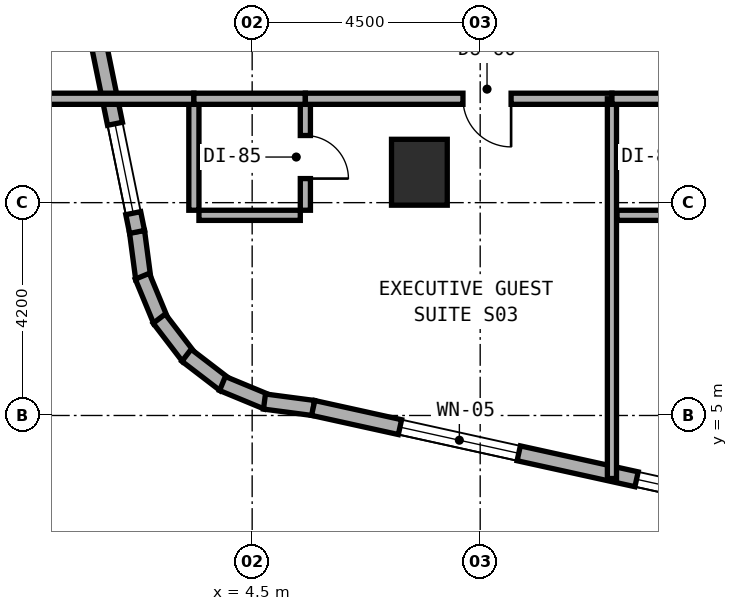
"""IFC4 building model, lengths in metres.
Left out: names, types, materials, properties, quantities, classifications, styles, units other than length and angle.
Written with IfcOpenShell. Run it as: python <this file> out.ifc"""

import sys

from ifc_helpers import new_model, si_unit, direction, frame, frame_2d, origin, origin_2d, place, context, subcontext, project, spatial, rectangle, extrude, element, fill, save


model = new_model("IFC4")
c1 = context("Model", 3, precision=1e-05, world=origin(), true_north=direction((0.0, 1.0)))
c2 = subcontext(c1, "Body", "Model", "MODEL_VIEW")
j1 = project(units=[si_unit("LENGTHUNIT", "METRE"), si_unit("PLANEANGLEUNIT", "RADIAN")], contexts=[c1])
p1 = place(None, origin())
s1 = spatial("IfcSite", under=j1, at=p1, CompositionType="ELEMENT")
p2 = place(p1, origin())
s2 = spatial("IfcBuilding", under=s1, at=p2, CompositionType="ELEMENT")
p3 = place(p2, frame((0.0, 0.0, 45.0)))
s3 = spatial("IfcBuildingStorey", under=s2, at=p3, CompositionType="ELEMENT", Elevation=45.0)
p4 = place(p3, frame((7.8, 9.8, 0.0), z_axis=(0.0, 0.0, 1.0), x_axis=(1.0, 0.0, 0.0)))
e1 = element("IfcColumn", 1, at=p4, inside=s3, PredefinedType="COLUMN", context=c2, shape_type="SweptSolid", body=[
    extrude(rectangle(XDim=1.1, YDim=1.3, at=origin_2d()), origin(), (0.0, 0.0, 1.0), 3.5),
])
p5 = place(p3, frame((2.228, 8.628, 0.0), z_axis=(0.0, 0.0, 1.0), x_axis=(0.131174864804, -0.991359246108, 0.0)))
e2 = element("IfcWall", 2, at=p5, inside=s3, PredefinedType="STANDARD", context=c2, shape_type="SweptSolid", body=[
    extrude(rectangle(XDim=0.938, YDim=0.3, at=frame_2d((0.469, 0.0))), origin(), (0.0, 0.0, 1.0), 3.22),
])
p6 = place(p3, frame((2.332, 7.748, 0.0), z_axis=(0.0, 0.0, 1.0), x_axis=(0.382344263057, -0.924019948111, 0.0)))
e3 = element("IfcWall", 3, at=p6, inside=s3, PredefinedType="STANDARD", context=c2, shape_type="SweptSolid", body=[
    extrude(rectangle(XDim=0.955, YDim=0.3, at=frame_2d((0.477, 0.0))), origin(), (0.0, 0.0, 1.0), 3.22),
])
for number, where, z_axis, x_axis in (
    (4, (2.666, 6.911, 0.0), (0.0, 0.0, 1.0), (0.608, -0.794, 0.0)),
    (5, (3.205, 6.188, 0.0), (0.0, 0.0, 1.0), (0.794, -0.608, 0.0)),
):
    element("IfcWall", number, at=place(p3, frame(where, z_axis=z_axis, x_axis=x_axis)), inside=s3, PredefinedType="STANDARD", context=c2, shape_type="SweptSolid", body=[
        extrude(rectangle(XDim=0.955, YDim=0.3, at=frame_2d((0.478, 0.0))), origin(), (0.0, 0.0, 1.0), 3.22),
    ])
p7 = place(p3, frame((3.914, 5.631, 0.0), z_axis=(0.0, 0.0, 1.0), x_axis=(0.923982547689, -0.382434636986, 0.0)))
e6 = element("IfcWall", 6, at=p7, inside=s3, PredefinedType="STANDARD", context=c2, shape_type="SweptSolid", body=[
    extrude(rectangle(XDim=0.954, YDim=0.3, at=frame_2d((0.477, 0.0))), origin(), (0.0, 0.0, 1.0), 3.22),
])
p8 = place(p3, frame((4.743, 5.275, 0.0), z_axis=(0.0, 0.0, 1.0), x_axis=(0.99145856342, -0.130422072598, 0.0)))
e7 = element("IfcWall", 7, at=p8, inside=s3, PredefinedType="STANDARD", context=c2, shape_type="SweptSolid", body=[
    extrude(rectangle(XDim=0.973, YDim=0.3, at=frame_2d((0.487, 0.0))), origin(), (0.0, 0.0, 1.0), 3.22),
])
p9 = place(p3, frame((5.704, 5.148, 0.0), z_axis=(0.0, 0.0, 1.0), x_axis=(0.9765437942, -0.215318875183, 0.0)))
e8 = element("IfcWall", 8, at=p9, inside=s3, PredefinedType="STANDARD", context=c2, shape_type="SweptSolid", body=[
    extrude(rectangle(XDim=9.353, YDim=0.3, at=frame_2d((4.677, 0.0))), origin(), (0.0, 0.0, 1.0), 3.22),
])
p10 = place(p9, frame((1.754, 0.0, 0.8)))
e9 = element("IfcOpeningElement", 9, at=p10, cuts=e8, PredefinedType="OPENING", context=c2, shape_type="SweptSolid", body=[
    extrude(rectangle(XDim=2.4, YDim=1.6, at=frame_2d((1.2, 0.8))), frame((0.0, 0.16, 0.0), z_axis=(0.0, -1.0, 0.0), x_axis=(1.0, 0.0, 0.0)), (0.0, 0.0, 1.0), 0.32),
])
p11 = place(p9, frame((6.535, 0.0, 0.8)))
e10 = element("IfcOpeningElement", 10, at=p11, cuts=e8, PredefinedType="OPENING", context=c2, shape_type="SweptSolid", body=[
    extrude(rectangle(XDim=2.4, YDim=1.6, at=frame_2d((1.2, 0.8))), frame((0.0, 0.16, 0.0), z_axis=(0.0, -1.0, 0.0), x_axis=(1.0, 0.0, 0.0)), (0.0, 0.0, 1.0), 0.32),
])
p12 = place(p3, frame((0.216, 18.484, 0.0), z_axis=(0.0, 0.0, 1.0), x_axis=(0.199990901713, -0.979797754249, 0.0)))
e11 = element("IfcWall", 11, at=p12, inside=s3, PredefinedType="STANDARD", context=c2, shape_type="SweptSolid", body=[
    extrude(rectangle(XDim=10.065, YDim=0.3, at=frame_2d((5.033, 0.0))), origin(), (0.0, 0.0, 1.0), 3.22),
])
p13 = place(p12, frame((2.429, 0.0, 0.8)))
e12 = element("IfcOpeningElement", 12, at=p13, cuts=e11, PredefinedType="OPENING", context=c2, shape_type="SweptSolid", body=[
    extrude(rectangle(XDim=2.4, YDim=1.6, at=frame_2d((1.2, 0.8))), frame((0.0, 0.16, 0.0), z_axis=(0.0, -1.0, 0.0), x_axis=(1.0, 0.0, 0.0)), (0.0, 0.0, 1.0), 0.32),
])
p14 = place(p12, frame((7.887, 0.0, 0.85)))
e13 = element("IfcOpeningElement", 13, at=p14, cuts=e11, PredefinedType="OPENING", context=c2, shape_type="SweptSolid", body=[
    extrude(rectangle(XDim=1.8, YDim=1.5, at=frame_2d((0.9, 0.75))), frame((0.0, 0.16, 0.0), z_axis=(0.0, -1.0, 0.0), x_axis=(1.0, 0.0, 0.0)), (0.0, 0.0, 1.0), 0.32),
])
p15 = place(p3, frame((5.55, 9.05, 0.0), z_axis=(0.0, 0.0, 1.0), x_axis=(0.0, 1.0, 0.0)))
e14 = element("IfcWall", 14, at=p15, inside=s3, PredefinedType="PLUMBINGWALL", context=c2, shape_type="SweptSolid", body=[
    extrude(rectangle(XDim=2.1, YDim=0.2, at=frame_2d((1.05, 0.0))), origin(), (0.0, 0.0, 1.0), 3.22),
])
p16 = place(p15, frame((0.625, 0.0, 0.0)))
e15 = element("IfcOpeningElement", 15, at=p16, cuts=e14, PredefinedType="OPENING", context=c2, shape_type="SweptSolid", body=[
    extrude(rectangle(XDim=0.85, YDim=2.1, at=frame_2d((0.425, 1.05))), frame((0.0, 0.11, 0.0), z_axis=(0.0, -1.0, 0.0), x_axis=(1.0, 0.0, 0.0)), (0.0, 0.0, 1.0), 0.22),
])
p17 = place(p3, frame((3.45, 8.95, 0.0), z_axis=(0.0, 0.0, 1.0), x_axis=(1.0, 0.0, 0.0)))
e16 = element("IfcWall", 16, at=p17, inside=s3, PredefinedType="PLUMBINGWALL", context=c2, shape_type="SweptSolid", body=[
    extrude(rectangle(XDim=2.0, YDim=0.2, at=frame_2d((1.0, 0.0))), origin(), (0.0, 0.0, 1.0), 3.22),
])
p18 = place(p3, frame((3.35, 9.05, 0.0), z_axis=(0.0, 0.0, 1.0), x_axis=(0.0, 1.0, 0.0)))
e17 = element("IfcWall", 17, at=p18, inside=s3, PredefinedType="PLUMBINGWALL", context=c2, shape_type="SweptSolid", body=[
    extrude(rectangle(XDim=2.1, YDim=0.2, at=frame_2d((1.05, 0.0))), origin(), (0.0, 0.0, 1.0), 3.22),
])
p19 = place(p3, frame((0.24, 11.25, 0.0), z_axis=(0.0, 0.0, 1.0), x_axis=(1.0, 0.0, 0.0)))
e18 = element("IfcWall", 18, at=p19, inside=s3, PredefinedType="SOLIDWALL", context=c2, shape_type="SweptSolid", body=[
    extrude(rectangle(XDim=3.11, YDim=0.22, at=frame_2d((1.555, 0.0))), origin(), (0.0, 0.0, 1.0), 3.22),
])
p20 = place(p3, frame((3.35, 11.25, 0.0), z_axis=(0.0, 0.0, 1.0), x_axis=(1.0, 0.0, 0.0)))
e19 = element("IfcWall", 19, at=p20, inside=s3, PredefinedType="SOLIDWALL", context=c2, shape_type="SweptSolid", body=[
    extrude(rectangle(XDim=2.2, YDim=0.22, at=frame_2d((1.1, 0.0))), origin(), (0.0, 0.0, 1.0), 3.22),
])
p21 = place(p3, frame((5.55, 11.25, 0.0), z_axis=(0.0, 0.0, 1.0), x_axis=(1.0, 0.0, 0.0)))
e20 = element("IfcWall", 20, at=p21, inside=s3, PredefinedType="SOLIDWALL", context=c2, shape_type="SweptSolid", body=[
    extrude(rectangle(XDim=6.05, YDim=0.22, at=frame_2d((3.025, 0.0))), origin(), (0.0, 0.0, 1.0), 2.395),
])
p22 = place(p21, frame((3.11, 0.0, 0.0)))
e21 = element("IfcOpeningElement", 21, at=p22, cuts=e20, PredefinedType="OPENING", context=c2, shape_type="SweptSolid", body=[
    extrude(rectangle(XDim=0.95, YDim=2.1, at=frame_2d((0.475, 1.05))), frame((0.0, 0.12, 0.0), z_axis=(0.0, -1.0, 0.0), x_axis=(1.0, 0.0, 0.0)), (0.0, 0.0, 1.0), 0.24),
])
p23 = place(p3, frame((11.6, 3.756, 0.0), z_axis=(0.0, 0.0, 1.0), x_axis=(0.0, 1.0, 0.0)))
e22 = element("IfcWall", 22, at=p23, inside=s3, PredefinedType="SOLIDWALL", context=c2, shape_type="SweptSolid", body=[
    extrude(rectangle(XDim=7.494, YDim=0.18, at=frame_2d((3.747, 0.0))), origin(), (0.0, 0.0, 1.0), 2.745),
])
p24 = place(p3, frame((11.7, 8.95, 0.0), z_axis=(0.0, 0.0, 1.0), x_axis=(1.0, 0.0, 0.0)))
e23 = element("IfcWall", 23, at=p24, inside=s3, PredefinedType="PLUMBINGWALL", context=c2, shape_type="SweptSolid", body=[
    extrude(rectangle(XDim=2.0, YDim=0.2, at=frame_2d((1.0, 0.0))), origin(), (0.0, 0.0, 1.0), 3.22),
])
p25 = place(p3, frame((11.6, 11.25, 0.0), z_axis=(0.0, 0.0, 1.0), x_axis=(1.0, 0.0, 0.0)))
e24 = element("IfcWall", 24, at=p25, inside=s3, PredefinedType="SOLIDWALL", context=c2, shape_type="SweptSolid", body=[
    extrude(rectangle(XDim=2.2, YDim=0.22, at=frame_2d((1.1, 0.0))), origin(), (0.0, 0.0, 1.0), 2.925),
])
p26 = place(p10, origin())
e25 = element("IfcWindow", 25, at=p26, inside=s3, PartitioningType="SINGLE_PANEL", PredefinedType="WINDOW", context=c2, shape_type="SweptSolid", body=[
    extrude(rectangle(XDim=2.4, YDim=1.6, at=frame_2d((1.2, 0.8))), frame((0.0, 0.03, 0.0), z_axis=(0.0, -1.0, 0.0), x_axis=(1.0, 0.0, 0.0)), (0.0, 0.0, 1.0), 0.06),
])
fill(e9, e25)
p27 = place(p11, origin())
e26 = element("IfcWindow", 26, at=p27, inside=s3, PartitioningType="SINGLE_PANEL", PredefinedType="WINDOW", context=c2, shape_type="SweptSolid", body=[
    extrude(rectangle(XDim=2.4, YDim=1.6, at=frame_2d((1.2, 0.8))), frame((0.0, 0.03, 0.0), z_axis=(0.0, -1.0, 0.0), x_axis=(1.0, 0.0, 0.0)), (0.0, 0.0, 1.0), 0.06),
])
fill(e10, e26)
p28 = place(p14, origin())
e27 = element("IfcWindow", 27, at=p28, inside=s3, PartitioningType="SINGLE_PANEL", PredefinedType="WINDOW", context=c2, shape_type="SweptSolid", body=[
    extrude(rectangle(XDim=1.8, YDim=1.5, at=frame_2d((0.9, 0.75))), frame((0.0, 0.03, 0.0), z_axis=(0.0, -1.0, 0.0), x_axis=(1.0, 0.0, 0.0)), (0.0, 0.0, 1.0), 0.06),
])
fill(e13, e27)
p29 = place(p16, frame((0.85, 0.0, 0.0), z_axis=(0.0, 0.0, 1.0), x_axis=(-1.0, 0.0, 0.0)))
e28 = element("IfcDoor", 28, at=p29, inside=s3, OperationType="SINGLE_SWING_RIGHT", PredefinedType="DOOR", context=c2, shape_type="SweptSolid", body=[
    extrude(rectangle(XDim=0.85, YDim=2.1, at=frame_2d((0.425, 1.05))), frame((0.0, 0.025, 0.0), z_axis=(0.0, -1.0, 0.0), x_axis=(1.0, 0.0, 0.0)), (0.0, 0.0, 1.0), 0.05),
])
fill(e15, e28)
p30 = place(p22, frame((0.95, 0.0, 0.0), z_axis=(0.0, 0.0, 1.0), x_axis=(-1.0, 0.0, 0.0)))
e29 = element("IfcDoor", 29, at=p30, inside=s3, OperationType="SINGLE_SWING_LEFT", PredefinedType="DOOR", context=c2, shape_type="SweptSolid", body=[
    extrude(rectangle(XDim=0.95, YDim=2.1, at=frame_2d((0.475, 1.05))), frame((0.0, 0.025, 0.0), z_axis=(0.0, -1.0, 0.0), x_axis=(1.0, 0.0, 0.0)), (0.0, 0.0, 1.0), 0.05),
])
fill(e21, e29)
save(model, sys.argv[1])
